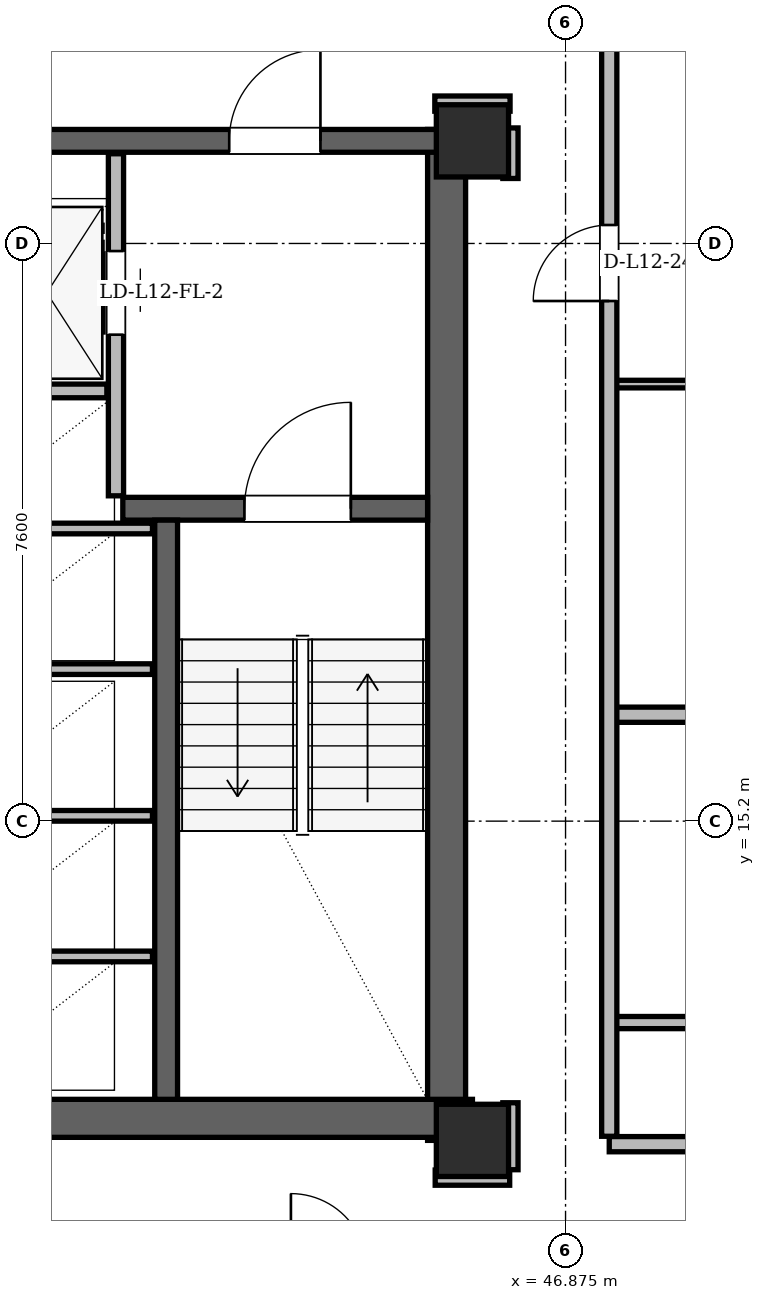
"""IFC4 building model, lengths in metres.
Left out: names, types, materials, properties, quantities, classifications, styles, units other than length and angle.
Written with IfcOpenShell. Run it as: python <this file> out.ifc"""

import sys

from ifc_helpers import new_model, si_unit, direction, frame, frame_2d, origin, origin_2d, place, context, subcontext, project, spatial, rectangle, hollow_rectangle, extrude, element, fill, save


model = new_model("IFC4")
c1 = context("Model", 3, precision=1e-05, world=origin(), true_north=direction((0.0, 1.0)))
c2 = subcontext(c1, "Body", "Model", "MODEL_VIEW")
j1 = project(units=[si_unit("LENGTHUNIT", "METRE"), si_unit("PLANEANGLEUNIT", "RADIAN")], contexts=[c1])
p1 = place(None, origin())
s1 = spatial("IfcSite", under=j1, at=p1, CompositionType="ELEMENT")
p2 = place(p1, origin())
s2 = spatial("IfcBuilding", under=s1, at=p2, CompositionType="ELEMENT")
p3 = place(p2, frame((0.0, 0.0, 48.9)))
s3 = spatial("IfcBuildingStorey", under=s2, at=p3, CompositionType="ELEMENT", Elevation=48.9)
for number, where, z_axis, x_axis in (
    (1, (45.65, 11.0, 0.0), (0.0, 0.0, 1.0), (1.0, 0.0, 0.0)),
    (2, (45.65, 24.15, 0.0), (0.0, 0.0, 1.0), (1.0, 0.0, 0.0)),
):
    element("IfcColumn", number, at=place(p3, frame(where, z_axis=z_axis, x_axis=x_axis)), inside=s3, PredefinedType="COLUMN", context=c2, shape_type="SweptSolid", body=[
        extrude(hollow_rectangle(XDim=0.95, YDim=0.95, WallThickness=0.08, at=origin_2d()), origin(), (0.0, 0.0, 1.0), 3.6),
    ])
p4 = place(p3, frame((45.31, 11.0, 0.0), z_axis=(0.0, 0.0, 1.0), x_axis=(0.0, 1.0, 0.0)))
e3 = element("IfcWall", 3, at=p4, inside=s3, PredefinedType="SHEAR", context=c2, shape_type="SweptSolid", body=[
    extrude(rectangle(XDim=13.3, YDim=0.5, at=frame_2d((6.65, 0.0))), origin(), (0.0, 0.0, 1.0), 3.36),
])
p5 = place(p3, frame((38.55, 11.29, 0.0), z_axis=(0.0, 0.0, 1.0), x_axis=(1.0, 0.0, 0.0)))
e4 = element("IfcWall", 4, at=p5, inside=s3, PredefinedType="SHEAR", context=c2, shape_type="SweptSolid", body=[
    extrude(rectangle(XDim=7.1, YDim=0.5, at=frame_2d((3.55, 0.0))), origin(), (0.0, 0.0, 1.0), 3.36),
])
p6 = place(p3, frame((29.65, 24.15, 0.0), z_axis=(0.0, 0.0, 1.0), x_axis=(1.0, 0.0, 0.0)))
e5 = element("IfcWall", 5, at=p6, inside=s3, PredefinedType="SHEAR", context=c2, shape_type="SweptSolid", body=[
    extrude(rectangle(XDim=15.7, YDim=0.3, at=frame_2d((7.85, 0.0))), origin(), (0.0, 0.0, 1.0), 3.36),
])
p7 = place(p6, frame((1.7, 0.0, 0.0)))
e6 = element("IfcOpeningElement", 6, at=p7, cuts=e5, PredefinedType="OPENING", context=c2, shape_type="SweptSolid", body=[
    extrude(rectangle(XDim=1.2, YDim=2.2, at=frame_2d((0.6, 1.1))), frame((0.0, 0.15, 0.0), z_axis=(0.0, -1.0, 0.0), x_axis=(1.0, 0.0, 0.0)), (0.0, 0.0, 1.0), 0.3),
])
p8 = place(p6, frame((12.8, 0.0, 0.0)))
e7 = element("IfcOpeningElement", 7, at=p8, cuts=e5, PredefinedType="OPENING", context=c2, shape_type="SweptSolid", body=[
    extrude(rectangle(XDim=1.2, YDim=2.2, at=frame_2d((0.6, 1.1))), frame((0.0, 0.15, 0.0), z_axis=(0.0, -1.0, 0.0), x_axis=(1.0, 0.0, 0.0)), (0.0, 0.0, 1.0), 0.3),
])
p9 = place(p6, frame((6.55, 0.0, 0.0)))
e8 = element("IfcOpeningElement", 8, at=p9, cuts=e5, PredefinedType="OPENING", context=c2, shape_type="SweptSolid", body=[
    extrude(rectangle(XDim=0.9, YDim=2.05, at=frame_2d((0.45, 1.025))), frame((0.0, 0.15, 0.0), z_axis=(0.0, -1.0, 0.0), x_axis=(1.0, 0.0, 0.0)), (0.0, 0.0, 1.0), 0.3),
])
p10 = place(p6, frame((8.45, 0.0, 0.0)))
e9 = element("IfcOpeningElement", 9, at=p10, cuts=e5, PredefinedType="OPENING", context=c2, shape_type="SweptSolid", body=[
    extrude(rectangle(XDim=0.9, YDim=2.05, at=frame_2d((0.45, 1.025))), frame((0.0, 0.15, 0.0), z_axis=(0.0, -1.0, 0.0), x_axis=(1.0, 0.0, 0.0)), (0.0, 0.0, 1.0), 0.3),
])
p11 = place(p3, frame((41.05, 19.31, 0.0), z_axis=(0.0, 0.0, 1.0), x_axis=(1.0, 0.0, 0.0)))
e10 = element("IfcWall", 10, at=p11, inside=s3, PredefinedType="SHEAR", context=c2, shape_type="SweptSolid", body=[
    extrude(rectangle(XDim=4.01, YDim=0.3, at=frame_2d((2.005, 0.0))), origin(), (0.0, 0.0, 1.0), 3.36),
])
p12 = place(p11, frame((1.6, 0.0, 0.0)))
e11 = element("IfcOpeningElement", 11, at=p12, cuts=e10, PredefinedType="OPENING", context=c2, shape_type="SweptSolid", body=[
    extrude(rectangle(XDim=1.4, YDim=2.2, at=frame_2d((0.7, 1.1))), frame((0.0, 0.15, 0.0), z_axis=(0.0, -1.0, 0.0), x_axis=(1.0, 0.0, 0.0)), (0.0, 0.0, 1.0), 0.3),
])
p13 = place(p3, frame((41.62, 11.54, 0.0), z_axis=(0.0, 0.0, 1.0), x_axis=(0.0, 1.0, 0.0)))
e12 = element("IfcWall", 12, at=p13, inside=s3, PredefinedType="SHEAR", context=c2, shape_type="SweptSolid", body=[
    extrude(rectangle(XDim=7.62, YDim=0.3, at=frame_2d((3.81, 0.0))), origin(), (0.0, 0.0, 1.0), 3.36),
])
p14 = place(p3, frame((40.96, 19.48, 0.0), z_axis=(0.0, 0.0, 1.0), x_axis=(0.0, 1.0, 0.0)))
e13 = element("IfcWall", 13, at=p14, inside=s3, PredefinedType="PARTITIONING", context=c2, shape_type="SweptSolid", body=[
    extrude(rectangle(XDim=4.5, YDim=0.2, at=frame_2d((2.25, 0.0))), origin(), (0.0, 0.0, 1.0), 2.4),
])
p15 = place(p14, frame((2.12, 0.0, 0.0)))
e14 = element("IfcOpeningElement", 14, at=p15, cuts=e13, PredefinedType="OPENING", context=c2, shape_type="SweptSolid", body=[
    extrude(rectangle(XDim=1.1, YDim=2.2, at=frame_2d((0.55, 1.1))), frame((0.0, 0.1, 0.0), z_axis=(0.0, -1.0, 0.0), x_axis=(1.0, 0.0, 0.0)), (0.0, 0.0, 1.0), 0.2),
])
p16 = place(p3, frame((39.26, 20.86, 0.0), z_axis=(0.0, 0.0, 1.0), x_axis=(1.0, 0.0, 0.0)))
e15 = element("IfcWall", 15, at=p16, inside=s3, PredefinedType="PARTITIONING", context=c2, shape_type="SweptSolid", body=[
    extrude(rectangle(XDim=1.58, YDim=0.18, at=frame_2d((0.79, 0.0))), origin(), (0.0, 0.0, 1.0), 3.36),
])
for number, where, z_axis, x_axis in (
    (16, (38.78, 13.42, 0.0), (0.0, 0.0, 1.0), (1.0, 0.0, 0.0)),
    (17, (38.78, 15.27, 0.0), (0.0, 0.0, 1.0), (1.0, 0.0, 0.0)),
    (18, (38.78, 17.2, 0.0), (0.0, 0.0, 1.0), (1.0, 0.0, 0.0)),
    (19, (38.78, 19.05, 0.0), (0.0, 0.0, 1.0), (1.0, 0.0, 0.0)),
):
    element("IfcWall", number, at=place(p3, frame(where, z_axis=z_axis, x_axis=x_axis)), inside=s3, PredefinedType="PARTITIONING", context=c2, shape_type="SweptSolid", body=[
        extrude(rectangle(XDim=2.66, YDim=0.14, at=frame_2d((1.33, 0.0))), origin(), (0.0, 0.0, 1.0), 3.36),
    ])
p17 = place(p3, frame((45.16, 10.51, 0.0), z_axis=(0.0, 0.0, 1.0), x_axis=(1.0, 0.0, 0.0)))
e20 = element("IfcWall", 20, at=p17, inside=s3, PredefinedType="PARTITIONING", context=c2, shape_type="SweptSolid", body=[
    extrude(rectangle(XDim=0.98, YDim=0.2, at=frame_2d((0.49, 0.0))), origin(), (0.0, 0.0, 1.0), 2.738),
])
p18 = place(p3, frame((47.45, 10.95, 0.0), z_axis=(0.0, 0.0, 1.0), x_axis=(1.0, 0.0, 0.0)))
e21 = element("IfcWall", 21, at=p18, inside=s3, PredefinedType="PARTITIONING", context=c2, shape_type="SweptSolid", body=[
    extrude(rectangle(XDim=8.35, YDim=0.2, at=frame_2d((4.175, 0.0))), origin(), (0.0, 0.0, 1.0), 3.36),
])
p19 = place(p3, frame((47.4, 12.55, 0.0), z_axis=(0.0, 0.0, 1.0), x_axis=(1.0, 0.0, 0.0)))
e22 = element("IfcWall", 22, at=p19, inside=s3, PredefinedType="PARTITIONING", context=c2, shape_type="SweptSolid", body=[
    extrude(rectangle(XDim=12.657, YDim=0.16, at=frame_2d((6.329, 0.0))), origin(), (0.0, 0.0, 1.0), 2.738),
])
p20 = place(p19, frame((3.922, 0.0, 0.0)))
e23 = element("IfcOpeningElement", 23, at=p20, cuts=e22, PredefinedType="OPENING", context=c2, shape_type="SweptSolid", body=[
    extrude(rectangle(XDim=0.92, YDim=2.12, at=frame_2d((0.46, 1.06))), frame((0.0, 0.08, 0.0), z_axis=(0.0, -1.0, 0.0), x_axis=(1.0, 0.0, 0.0)), (0.0, 0.0, 1.0), 0.16),
])
p21 = place(p19, frame((9.293, 0.0, 0.0)))
e24 = element("IfcOpeningElement", 24, at=p21, cuts=e22, PredefinedType="OPENING", context=c2, shape_type="SweptSolid", body=[
    extrude(rectangle(XDim=0.95, YDim=2.1, at=frame_2d((0.475, 1.05))), frame((0.0, 0.08, 0.0), z_axis=(0.0, -1.0, 0.0), x_axis=(1.0, 0.0, 0.0)), (0.0, 0.0, 1.0), 0.16),
])
p22 = place(p19, frame((11.313, 0.0, 0.0)))
e25 = element("IfcOpeningElement", 25, at=p22, cuts=e22, PredefinedType="OPENING", context=c2, shape_type="SweptSolid", body=[
    extrude(rectangle(XDim=0.88, YDim=2.08, at=frame_2d((0.44, 1.04))), frame((0.0, 0.08, 0.0), z_axis=(0.0, -1.0, 0.0), x_axis=(1.0, 0.0, 0.0)), (0.0, 0.0, 1.0), 0.16),
])
p23 = place(p3, frame((47.45, 16.6, 0.0), z_axis=(0.0, 0.0, 1.0), x_axis=(1.0, 0.0, 0.0)))
e26 = element("IfcWall", 26, at=p23, inside=s3, PredefinedType="PARTITIONING", context=c2, shape_type="SweptSolid", body=[
    extrude(rectangle(XDim=12.795, YDim=0.2, at=frame_2d((6.397, 0.0))), origin(), (0.0, 0.0, 1.0), 2.494),
])
p24 = place(p3, frame((47.4, 20.95, 0.0), z_axis=(0.0, 0.0, 1.0), x_axis=(1.0, 0.0, 0.0)))
e27 = element("IfcWall", 27, at=p24, inside=s3, PredefinedType="PARTITIONING", context=c2, shape_type="SweptSolid", body=[
    extrude(rectangle(XDim=10.333, YDim=0.1, at=frame_2d((5.167, 0.0))), origin(), (0.0, 0.0, 1.0), 3.36),
])
p25 = place(p24, frame((2.76, 0.0, 0.0)))
e28 = element("IfcOpeningElement", 28, at=p25, cuts=e27, PredefinedType="OPENING", context=c2, shape_type="SweptSolid", body=[
    extrude(rectangle(XDim=0.92, YDim=2.12, at=frame_2d((0.46, 1.06))), frame((0.0, 0.05, 0.0), z_axis=(0.0, -1.0, 0.0), x_axis=(1.0, 0.0, 0.0)), (0.0, 0.0, 1.0), 0.1),
])
p26 = place(p24, frame((6.971, 0.0, 0.0)))
e29 = element("IfcOpeningElement", 29, at=p26, cuts=e27, PredefinedType="OPENING", context=c2, shape_type="SweptSolid", body=[
    extrude(rectangle(XDim=0.95, YDim=2.1, at=frame_2d((0.475, 1.05))), frame((0.0, 0.05, 0.0), z_axis=(0.0, -1.0, 0.0), x_axis=(1.0, 0.0, 0.0)), (0.0, 0.0, 1.0), 0.1),
])
p27 = place(p24, frame((8.991, 0.0, 0.0)))
e30 = element("IfcOpeningElement", 30, at=p27, cuts=e27, PredefinedType="OPENING", context=c2, shape_type="SweptSolid", body=[
    extrude(rectangle(XDim=0.88, YDim=2.08, at=frame_2d((0.44, 1.04))), frame((0.0, 0.05, 0.0), z_axis=(0.0, -1.0, 0.0), x_axis=(1.0, 0.0, 0.0)), (0.0, 0.0, 1.0), 0.1),
])
p28 = place(p3, frame((45.155, 24.64, 0.0), z_axis=(0.0, 0.0, 1.0), x_axis=(1.0, 0.0, 0.0)))
e31 = element("IfcWall", 31, at=p28, inside=s3, PredefinedType="PARTITIONING", context=c2, shape_type="SweptSolid", body=[
    extrude(rectangle(XDim=0.99, YDim=0.2, at=frame_2d((0.495, 0.0))), origin(), (0.0, 0.0, 1.0), 2.738),
])
p29 = place(p3, frame((46.15, 10.614, 0.0), z_axis=(0.0, 0.0, 1.0), x_axis=(0.0, 1.0, 0.0)))
e32 = element("IfcWall", 32, at=p29, inside=s3, PredefinedType="PARTITIONING", context=c2, shape_type="SweptSolid", body=[
    extrude(rectangle(XDim=0.881, YDim=0.2, at=frame_2d((0.44, 0.0))), origin(), (0.0, 0.0, 1.0), 2.738),
])
p30 = place(p3, frame((46.15, 23.655, 0.0), z_axis=(0.0, 0.0, 1.0), x_axis=(0.0, 1.0, 0.0)))
e33 = element("IfcWall", 33, at=p30, inside=s3, PredefinedType="PARTITIONING", context=c2, shape_type="SweptSolid", body=[
    extrude(rectangle(XDim=0.665, YDim=0.2, at=frame_2d((0.333, 0.0))), origin(), (0.0, 0.0, 1.0), 2.946),
])
p31 = place(p3, frame((47.45, 11.054, 0.0), z_axis=(0.0, 0.0, 1.0), x_axis=(0.0, 1.0, 0.0)))
e34 = element("IfcWall", 34, at=p31, inside=s3, PredefinedType="PARTITIONING", context=c2, shape_type="SweptSolid", body=[
    extrude(rectangle(XDim=27.683, YDim=0.2, at=frame_2d((13.841, 0.0))), origin(), (0.0, 0.0, 1.0), 2.494),
])
p32 = place(p31, frame((10.989, 0.0, 0.0)))
e35 = element("IfcOpeningElement", 35, at=p32, cuts=e34, PredefinedType="OPENING", context=c2, shape_type="SweptSolid", body=[
    extrude(rectangle(XDim=1.0, YDim=2.18, at=frame_2d((0.5, 1.09))), frame((0.0, 0.1, 0.0), z_axis=(0.0, -1.0, 0.0), x_axis=(1.0, 0.0, 0.0)), (0.0, 0.0, 1.0), 0.2),
])
p33 = place(p15, origin())
e36 = element("IfcDoor", 36, at=p33, inside=s3, OperationType="SLIDING_TO_RIGHT", PredefinedType="DOOR", context=c2, shape_type="SweptSolid", body=[
    extrude(rectangle(XDim=1.1, YDim=2.2, at=frame_2d((0.55, 1.1))), frame((0.0, 0.025, 0.0), z_axis=(0.0, -1.0, 0.0), x_axis=(1.0, 0.0, 0.0)), (0.0, 0.0, 1.0), 0.05),
])
fill(e14, e36)
p34 = place(p12, origin())
e37 = element("IfcDoor", 37, at=p34, inside=s3, OperationType="SINGLE_SWING_RIGHT", PredefinedType="DOOR", context=c2, shape_type="SweptSolid", body=[
    extrude(rectangle(XDim=1.4, YDim=2.2, at=frame_2d((0.7, 1.1))), frame((0.0, 0.025, 0.0), z_axis=(0.0, -1.0, 0.0), x_axis=(1.0, 0.0, 0.0)), (0.0, 0.0, 1.0), 0.05),
])
fill(e11, e37)
p35 = place(p8, origin())
e38 = element("IfcDoor", 38, at=p35, inside=s3, OperationType="SINGLE_SWING_RIGHT", PredefinedType="DOOR", context=c2, shape_type="SweptSolid", body=[
    extrude(rectangle(XDim=1.2, YDim=2.2, at=frame_2d((0.6, 1.1))), frame((0.0, 0.025, 0.0), z_axis=(0.0, -1.0, 0.0), x_axis=(1.0, 0.0, 0.0)), (0.0, 0.0, 1.0), 0.05),
])
fill(e7, e38)
p36 = place(p32, origin())
e39 = element("IfcDoor", 39, at=p36, inside=s3, OperationType="SINGLE_SWING_LEFT", PredefinedType="DOOR", context=c2, shape_type="SweptSolid", body=[
    extrude(rectangle(XDim=1.0, YDim=2.18, at=frame_2d((0.5, 1.09))), frame((0.0, 0.025, 0.0), z_axis=(0.0, -1.0, 0.0), x_axis=(1.0, 0.0, 0.0)), (0.0, 0.0, 1.0), 0.05),
])
fill(e35, e39)
save(model, sys.argv[1])
